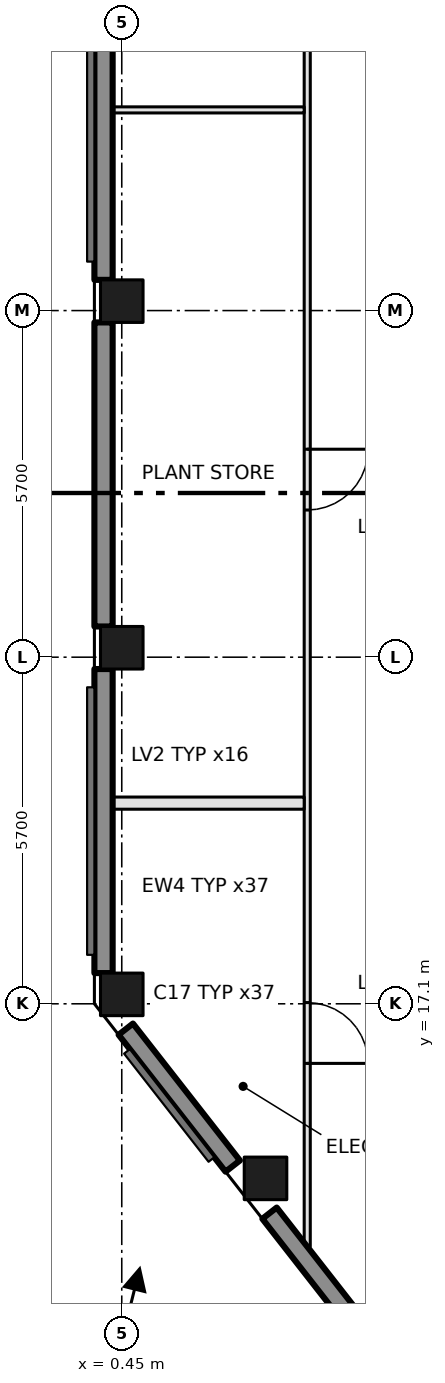
"""IFC4 building model, lengths in metres.
Left out: names, types, materials, properties, quantities, classifications, styles, units other than length and angle.
Written with IfcOpenShell. Run it as: python <this file> out.ifc"""

import sys

from ifc_helpers import new_model, si_unit, direction, frame, frame_2d, origin, origin_2d, place, context, subcontext, project, spatial, rectangle, extrude, element, fill, save


model = new_model("IFC4")
c1 = context("Model", 3, precision=1e-05, world=origin(), true_north=direction((0.0, 1.0)))
c2 = subcontext(c1, "Body", "Model", "MODEL_VIEW")
j1 = project(units=[si_unit("LENGTHUNIT", "METRE"), si_unit("PLANEANGLEUNIT", "RADIAN")], contexts=[c1])
p1 = place(None, origin())
s1 = spatial("IfcSite", under=j1, at=p1, CompositionType="ELEMENT")
p2 = place(p1, origin())
s2 = spatial("IfcBuilding", under=s1, at=p2, CompositionType="ELEMENT")
p3 = place(p2, frame((0.0, 0.0, 400.2)))
s3 = spatial("IfcBuildingStorey", under=s2, at=p3, CompositionType="ELEMENT", Elevation=400.2)
for number, where, z_axis, x_axis in (
    (1, (0.45, 17.255, 0.0), (0.0, 0.0, 1.0), (1.0, 0.0, 0.0)),
    (2, (0.45, 22.955, 0.0), (0.0, 0.0, 1.0), (1.0, 0.0, 0.0)),
    (3, (0.45, 28.655, 0.0), (0.0, 0.0, 1.0), (1.0, 0.0, 0.0)),
    (4, (2.814, 14.229, 0.0), (0.0, 0.0, 1.0), (1.0, 0.0, 0.0)),
):
    element("IfcColumn", number, at=place(p3, frame(where, z_axis=z_axis, x_axis=x_axis)), inside=s3, PredefinedType="COLUMN", context=c2, shape_type="SweptSolid", body=[
        extrude(rectangle(XDim=0.7, YDim=0.7, at=origin_2d()), origin(), (0.0, 0.0, 1.0), 4.8),
    ])
p4 = place(p3, frame((3.5, 43.2, 0.0), z_axis=(0.0, 0.0, 1.0), x_axis=(0.0, -1.0, 0.0)))
e5 = element("IfcWall", 5, at=p4, inside=s3, PredefinedType="PARTITIONING", context=c2, shape_type="SweptSolid", body=[
    extrude(rectangle(XDim=30.093, YDim=0.1, at=frame_2d((15.046, 0.0))), origin(), (0.0, 0.0, 1.0), 4.5),
])
p5 = place(p4, frame((26.08, 0.0, 0.0)))
e6 = element("IfcOpeningElement", 6, at=p5, cuts=e5, PredefinedType="OPENING", context=c2, shape_type="SweptSolid", body=[
    extrude(rectangle(XDim=1.0, YDim=2.1, at=frame_2d((0.5, 1.05))), frame((0.0, 0.06, 0.0), z_axis=(0.0, -1.0, 0.0), x_axis=(1.0, 0.0, 0.0)), (0.0, 0.0, 1.0), 0.12),
])
p6 = place(p4, frame((16.98, 0.0, 0.0)))
e7 = element("IfcOpeningElement", 7, at=p6, cuts=e5, PredefinedType="OPENING", context=c2, shape_type="SweptSolid", body=[
    extrude(rectangle(XDim=1.0, YDim=2.1, at=frame_2d((0.5, 1.05))), frame((0.0, 0.06, 0.0), z_axis=(0.0, -1.0, 0.0), x_axis=(1.0, 0.0, 0.0)), (0.0, 0.0, 1.0), 0.12),
])
p7 = place(p3, frame((3.45, 20.4, 0.0), z_axis=(0.0, 0.0, 1.0), x_axis=(-1.0, 0.0, 0.0)))
e8 = element("IfcWall", 8, at=p7, inside=s3, PredefinedType="PARTITIONING", context=c2, shape_type="SweptSolid", body=[
    extrude(rectangle(XDim=3.15, YDim=0.2, at=frame_2d((1.575, 0.0))), origin(), (0.0, 0.0, 1.0), 4.5),
])
p8 = place(p3, frame((3.45, 31.8, 0.0), z_axis=(0.0, 0.0, 1.0), x_axis=(-1.0, 0.0, 0.0)))
e9 = element("IfcWall", 9, at=p8, inside=s3, PredefinedType="PARTITIONING", context=c2, shape_type="SweptSolid", body=[
    extrude(rectangle(XDim=3.15, YDim=0.1, at=frame_2d((1.575, 0.0))), origin(), (0.0, 0.0, 1.0), 4.5),
])
for number, where, z_axis, x_axis in (
    (10, (0.15, 34.005, 0.0), (0.0, 0.0, 1.0), (0.0, -1.0, 0.0)),
    (11, (0.15, 28.305, 0.0), (0.0, 0.0, 1.0), (0.0, -1.0, 0.0)),
    (12, (0.15, 22.605, 0.0), (0.0, 0.0, 1.0), (0.0, -1.0, 0.0)),
):
    element("IfcWall", number, at=place(p3, frame(where, z_axis=z_axis, x_axis=x_axis)), inside=s3, PredefinedType="SOLIDWALL", context=c2, shape_type="SweptSolid", body=[
        extrude(rectangle(XDim=5.0, YDim=0.3, at=frame_2d((2.5, 0.0))), origin(), (0.0, 0.0, 1.0), 3.85),
    ])
p9 = place(p3, frame((0.516, 16.683, 0.0), z_axis=(0.0, 0.0, 1.0), x_axis=(0.615483207854, -0.788149998953, 0.0)))
e13 = element("IfcWall", 13, at=p9, inside=s3, PredefinedType="SOLIDWALL", context=c2, shape_type="SweptSolid", body=[
    extrude(rectangle(XDim=2.858, YDim=0.3, at=frame_2d((1.429, 0.0))), origin(), (0.0, 0.0, 1.0), 3.85),
])
p10 = place(p3, frame((2.88, 13.657, 0.0), z_axis=(0.0, 0.0, 1.0), x_axis=(0.61578764214, -0.787912165021, 0.0)))
e14 = element("IfcWall", 14, at=p10, inside=s3, PredefinedType="SOLIDWALL", context=c2, shape_type="SweptSolid", body=[
    extrude(rectangle(XDim=4.718, YDim=0.3, at=frame_2d((2.359, 0.0))), origin(), (0.0, 0.0, 1.0), 3.85),
])
p11 = place(p5, origin())
e15 = element("IfcDoor", 15, at=p11, inside=s3, OperationType="SINGLE_SWING_RIGHT", PredefinedType="DOOR", context=c2, shape_type="SweptSolid", body=[
    extrude(rectangle(XDim=1.0, YDim=2.1, at=frame_2d((0.5, 1.05))), frame((0.0, 0.025, 0.0), z_axis=(0.0, -1.0, 0.0), x_axis=(1.0, 0.0, 0.0)), (0.0, 0.0, 1.0), 0.05),
])
fill(e6, e15)
p12 = place(p6, origin())
e16 = element("IfcDoor", 16, at=p12, inside=s3, OperationType="SINGLE_SWING_LEFT", PredefinedType="DOOR", context=c2, shape_type="SweptSolid", body=[
    extrude(rectangle(XDim=1.0, YDim=2.1, at=frame_2d((0.5, 1.05))), frame((0.0, 0.025, 0.0), z_axis=(0.0, -1.0, 0.0), x_axis=(1.0, 0.0, 0.0)), (0.0, 0.0, 1.0), 0.05),
])
fill(e7, e16)
save(model, sys.argv[1])
